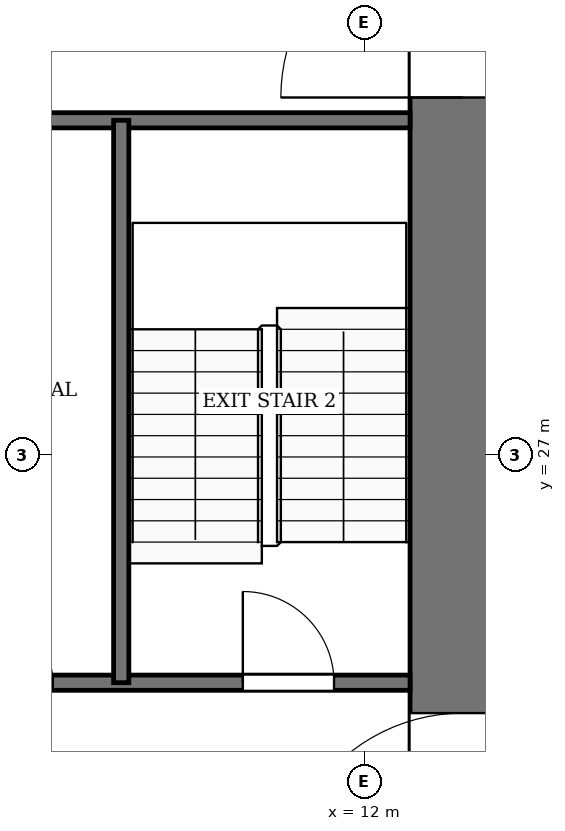
"""IFC4 building model, lengths in metres.
Left out: names, types, materials, properties, quantities, classifications, styles, units other than length and angle.
Written with IfcOpenShell. Run it as: python <this file> out.ifc"""

import sys

from ifc_helpers import new_model, si_unit, direction, frame, frame_2d, origin, place, context, subcontext, project, spatial, rectangle, extrude, element, fill, save


model = new_model("IFC4")
c1 = context("Model", 3, precision=1e-05, world=origin(), true_north=direction((0.0, 1.0)))
c2 = subcontext(c1, "Body", "Model", "MODEL_VIEW")
j1 = project(units=[si_unit("LENGTHUNIT", "METRE"), si_unit("PLANEANGLEUNIT", "RADIAN")], contexts=[c1])
p1 = place(None, origin())
s1 = spatial("IfcSite", under=j1, at=p1, CompositionType="ELEMENT")
p2 = place(p1, origin())
s2 = spatial("IfcBuilding", under=s1, at=p2, CompositionType="ELEMENT")
p3 = place(p2, frame((0.0, 0.0, 22.0)))
s3 = spatial("IfcBuildingStorey", under=s2, at=p3, CompositionType="ELEMENT", Elevation=22.0)
p4 = place(p3, frame((13.3, 18.4, -0.13), z_axis=(0.0, 0.0, 1.0), x_axis=(0.0, 1.0, 0.0)))
e1 = element("IfcWall", 1, at=p4, inside=s3, PredefinedType="SHEAR", context=c2, shape_type="SweptSolid", body=[
    extrude(rectangle(XDim=19.2, YDim=1.4, at=frame_2d((9.6, 0.0))), origin(), (0.0, 0.0, 1.0), 4.0),
])
p5 = place(p4, frame((2.8, 0.0, 0.13)))
e2 = element("IfcOpeningElement", 2, at=p5, cuts=e1, PredefinedType="OPENING", context=c2, shape_type="SweptSolid", body=[
    extrude(rectangle(XDim=2.4, YDim=2.4, at=frame_2d((1.2, 1.2))), frame((0.0, 0.71, 0.0), z_axis=(0.0, -1.0, 0.0), x_axis=(1.0, 0.0, 0.0)), (0.0, 0.0, 1.0), 1.42),
])
p6 = place(p4, frame((13.3, 0.0, 0.13)))
e3 = element("IfcOpeningElement", 3, at=p6, cuts=e1, PredefinedType="OPENING", context=c2, shape_type="SweptSolid", body=[
    extrude(rectangle(XDim=2.4, YDim=2.4, at=frame_2d((1.2, 1.2))), frame((0.0, 0.71, 0.0), z_axis=(0.0, -1.0, 0.0), x_axis=(1.0, 0.0, 0.0)), (0.0, 0.0, 1.0), 1.42),
])
p7 = place(p3, frame((6.0, 24.0, 0.0), z_axis=(0.0, 0.0, 1.0), x_axis=(1.0, 0.0, 0.0)))
e4 = element("IfcWall", 4, at=p7, inside=s3, PredefinedType="PARTITIONING", context=c2, shape_type="SweptSolid", body=[
    extrude(rectangle(XDim=6.6, YDim=0.2, at=frame_2d((3.3, 0.0))), origin(), (0.0, 0.0, 1.0), 3.87),
])
p8 = place(p7, frame((0.9, 0.0, 0.0)))
e5 = element("IfcOpeningElement", 5, at=p8, cuts=e4, PredefinedType="OPENING", context=c2, shape_type="SweptSolid", body=[
    extrude(rectangle(XDim=1.0, YDim=2.1, at=frame_2d((0.5, 1.05))), frame((0.0, 0.11, 0.0), z_axis=(0.0, -1.0, 0.0), x_axis=(1.0, 0.0, 0.0)), (0.0, 0.0, 1.0), 0.22),
])
p9 = place(p7, frame((4.4, 0.0, 0.0)))
e6 = element("IfcOpeningElement", 6, at=p9, cuts=e4, PredefinedType="OPENING", context=c2, shape_type="SweptSolid", body=[
    extrude(rectangle(XDim=1.2, YDim=2.2, at=frame_2d((0.6, 1.1))), frame((0.0, 0.11, 0.0), z_axis=(0.0, -1.0, 0.0), x_axis=(1.0, 0.0, 0.0)), (0.0, 0.0, 1.0), 0.22),
])
p10 = place(p3, frame((6.0, 31.4, 0.0), z_axis=(0.0, 0.0, 1.0), x_axis=(1.0, 0.0, 0.0)))
e7 = element("IfcWall", 7, at=p10, inside=s3, PredefinedType="PARTITIONING", context=c2, shape_type="SweptSolid", body=[
    extrude(rectangle(XDim=6.6, YDim=0.2, at=frame_2d((3.3, 0.0))), origin(), (0.0, 0.0, 1.0), 3.87),
])
p11 = place(p3, frame((8.8, 24.0, 0.0), z_axis=(0.0, 0.0, 1.0), x_axis=(0.0, 1.0, 0.0)))
e8 = element("IfcWall", 8, at=p11, inside=s3, PredefinedType="PARTITIONING", context=c2, shape_type="SweptSolid", body=[
    extrude(rectangle(XDim=7.4, YDim=0.2, at=frame_2d((3.7, 0.0))), origin(), (0.0, 0.0, 1.0), 3.87),
])
p12 = place(p9, origin())
e9 = element("IfcDoor", 9, at=p12, inside=s3, OperationType="SINGLE_SWING_LEFT", PredefinedType="DOOR", context=c2, shape_type="SweptSolid", body=[
    extrude(rectangle(XDim=1.2, YDim=2.2, at=frame_2d((0.6, 1.1))), frame((0.0, 0.025, 0.0), z_axis=(0.0, -1.0, 0.0), x_axis=(1.0, 0.0, 0.0)), (0.0, 0.0, 1.0), 0.05),
])
fill(e6, e9)
p13 = place(p5, origin())
e10 = element("IfcDoor", 10, at=p13, inside=s3, OperationType="DOUBLE_DOOR_SINGLE_SWING", PredefinedType="DOOR", context=c2, shape_type="SweptSolid", body=[
    extrude(rectangle(XDim=2.4, YDim=2.4, at=frame_2d((1.2, 1.2))), frame((0.0, 0.025, 0.0), z_axis=(0.0, -1.0, 0.0), x_axis=(1.0, 0.0, 0.0)), (0.0, 0.0, 1.0), 0.05),
])
fill(e2, e10)
p14 = place(p6, origin())
e11 = element("IfcDoor", 11, at=p14, inside=s3, OperationType="DOUBLE_DOOR_SINGLE_SWING", PredefinedType="DOOR", context=c2, shape_type="SweptSolid", body=[
    extrude(rectangle(XDim=2.4, YDim=2.4, at=frame_2d((1.2, 1.2))), frame((0.0, 0.025, 0.0), z_axis=(0.0, -1.0, 0.0), x_axis=(1.0, 0.0, 0.0)), (0.0, 0.0, 1.0), 0.05),
])
fill(e3, e11)
save(model, sys.argv[1])
